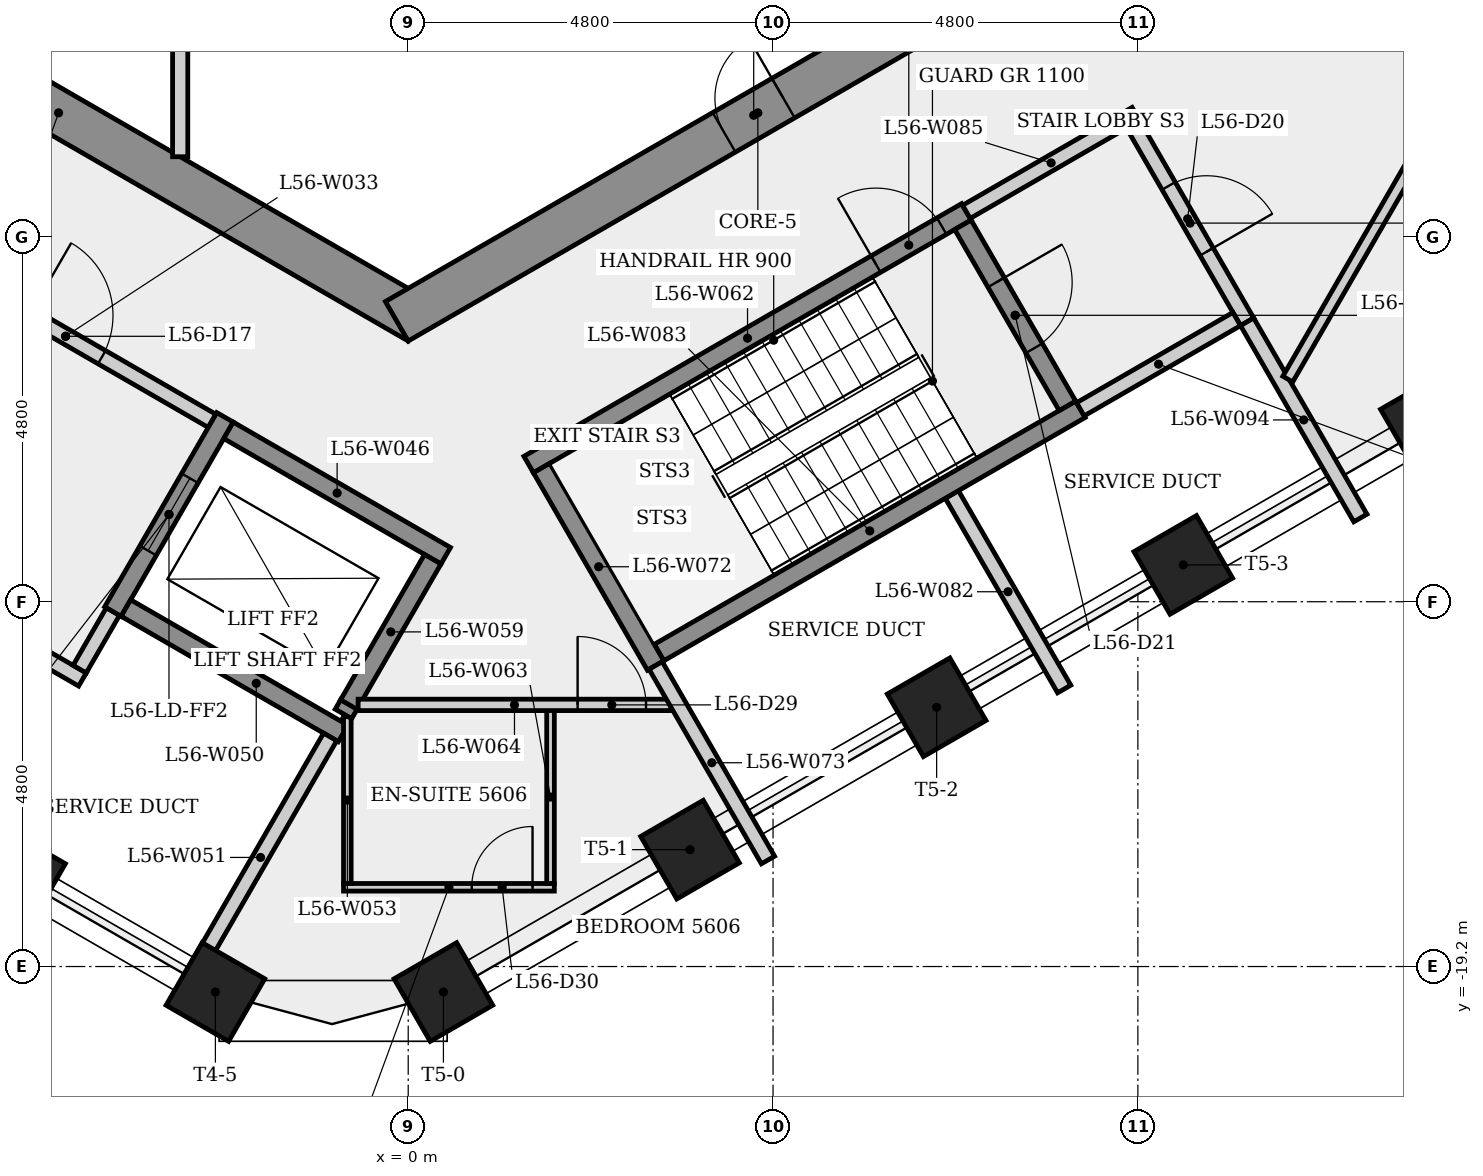
"""IFC4 building model, lengths in metres.
Left out: names, types, materials, properties, quantities, classifications, styles, units other than length and angle.
Written with IfcOpenShell. Run it as: python <this file> out.ifc"""

import sys

from ifc_helpers import new_model, si_unit, direction, frame, frame_2d, origin, origin_2d, place, context, subcontext, project, spatial, rectangle, extrude, element, fill, save


model = new_model("IFC4")
c1 = context("Model", 3, precision=1e-05, world=origin(), true_north=direction((0.0, 1.0)))
c2 = subcontext(c1, "Body", "Model", "MODEL_VIEW")
j1 = project(units=[si_unit("LENGTHUNIT", "METRE"), si_unit("PLANEANGLEUNIT", "RADIAN")], contexts=[c1])
p1 = place(None, origin())
s1 = spatial("IfcSite", under=j1, at=p1, CompositionType="ELEMENT")
p2 = place(p1, origin())
s2 = spatial("IfcBuilding", under=s1, at=p2, CompositionType="ELEMENT")
p3 = place(p2, frame((0.0, 0.0, 210.1)))
s3 = spatial("IfcBuildingStorey", under=s2, at=p3, CompositionType="ELEMENT", Elevation=210.1)
p4 = place(p3, frame((-9.35, -5.225, 0.0), z_axis=(0.0, 0.0, 1.0), x_axis=(0.866023993627, -0.500002442456, 0.0)))
e1 = element("IfcWall", 1, at=p4, inside=s3, PredefinedType="SHEAR", context=c2, shape_type="SweptSolid", body=[
    extrude(rectangle(XDim=10.97, YDim=0.6, at=frame_2d((5.485, 0.0))), origin(), (0.0, 0.0, 1.0), 4.0),
])
p5 = place(p4, frame((3.315, 0.0, 0.0)))
e2 = element("IfcOpeningElement", 2, at=p5, cuts=e1, PredefinedType="OPENING", context=c2, shape_type="SweptSolid", body=[
    extrude(rectangle(XDim=0.9, YDim=2.1, at=frame_2d((0.45, 1.05))), frame((0.0, 0.31, 0.0), z_axis=(0.0, -1.0, 0.0), x_axis=(1.0, 0.0, 0.0)), (0.0, 0.0, 1.0), 0.62),
])
p6 = place(p3, frame((-0.15, -10.71, 0.0), z_axis=(0.0, 0.0, 1.0), x_axis=(0.866023993627, 0.500002442456, 0.0)))
e3 = element("IfcWall", 3, at=p6, inside=s3, PredefinedType="SHEAR", context=c2, shape_type="SweptSolid", body=[
    extrude(rectangle(XDim=10.97, YDim=0.6, at=frame_2d((5.485, 0.0))), origin(), (0.0, 0.0, 1.0), 4.0),
])
p7 = place(p6, frame((4.972, 0.0, 0.0)))
e4 = element("IfcOpeningElement", 4, at=p7, cuts=e3, PredefinedType="OPENING", context=c2, shape_type="SweptSolid", body=[
    extrude(rectangle(XDim=0.9, YDim=2.1, at=frame_2d((0.45, 1.05))), frame((0.0, 0.31, 0.0), z_axis=(0.0, -1.0, 0.0), x_axis=(1.0, 0.0, 0.0)), (0.0, 0.0, 1.0), 0.62),
])
for number, where, z_axis, x_axis in (
    (5, (-5.159, -18.021, 0.0), (0.0, 0.0, 1.0), (-0.5, -0.866, 0.0)),
    (6, (-2.537, -19.535, 0.0), (0.0, 0.0, 1.0), (-0.5, -0.866, 0.0)),
    (7, (0.463, -19.535, 0.0), (0.0, 0.0, 1.0), (0.5, -0.866, 0.0)),
    (8, (3.708, -17.662, 0.0), (0.0, 0.0, 1.0), (0.5, -0.866, 0.0)),
    (9, (6.953, -15.789, 0.0), (0.0, 0.0, 1.0), (0.5, -0.866, 0.0)),
    (10, (10.197, -13.916, 0.0), (0.0, 0.0, 1.0), (0.5, -0.866, 0.0)),
    (11, (13.442, -12.042, 0.0), (0.0, 0.0, 1.0), (0.5, -0.866, 0.0)),
):
    element("IfcColumn", number, at=place(p3, frame(where, z_axis=z_axis, x_axis=x_axis)), inside=s3, PredefinedType="COLUMN", context=c2, shape_type="SweptSolid", body=[
        extrude(rectangle(XDim=0.95, YDim=0.95, at=origin_2d()), origin(), (0.0, 0.0, 1.0), 4.0),
    ])
p8 = place(p3, frame((-8.356, -13.073, 0.0), z_axis=(0.0, 0.0, 1.0), x_axis=(0.866038532462, -0.499977259774, 0.0)))
e12 = element("IfcWall", 12, at=p8, inside=s3, PredefinedType="PLUMBINGWALL", context=c2, shape_type="SweptSolid", body=[
    extrude(rectangle(XDim=4.7, YDim=0.2, at=frame_2d((2.35, 0.0))), origin(), (0.0, 0.0, 1.0), 3.6),
])
p9 = place(p3, frame((-6.435, -9.795, 0.0), z_axis=(0.0, 0.0, 1.0), x_axis=(0.866012907634, -0.500021643343, 0.0)))
e13 = element("IfcWall", 13, at=p9, inside=s3, PredefinedType="PARTITIONING", context=c2, shape_type="SweptSolid", body=[
    extrude(rectangle(XDim=4.45, YDim=0.2, at=frame_2d((2.225, 0.0))), origin(), (0.0, 0.0, 1.0), 3.6),
])
p10 = place(p9, frame((1.675, 0.0, 0.0)))
e14 = element("IfcOpeningElement", 14, at=p10, cuts=e13, PredefinedType="OPENING", context=c2, shape_type="SweptSolid", body=[
    extrude(rectangle(XDim=1.1, YDim=2.1, at=frame_2d((0.55, 1.05))), frame((0.0, 0.11, 0.0), z_axis=(0.0, -1.0, 0.0), x_axis=(1.0, 0.0, 0.0)), (0.0, 0.0, 1.0), 0.22),
])
p11 = place(p3, frame((-3.885, -14.529, 0.0), z_axis=(0.0, 0.0, 1.0), x_axis=(-0.499859285417, -0.866106630146, 0.0)))
e15 = element("IfcWall", 15, at=p11, inside=s3, PredefinedType="PLUMBINGWALL", context=c2, shape_type="SweptSolid", body=[
    extrude(rectangle(XDim=0.875, YDim=0.2, at=frame_2d((0.438, 0.0))), origin(), (0.0, 0.0, 1.0), 3.6),
])
p12 = place(p3, frame((-3.0, -5.25, 0.0), z_axis=(0.0, 0.0, 1.0), x_axis=(0.0, -1.0, 0.0)))
e16 = element("IfcWall", 16, at=p12, inside=s3, PredefinedType="PARTITIONING", context=c2, shape_type="SweptSolid", body=[
    extrude(rectangle(XDim=3.295, YDim=0.2, at=frame_2d((1.647, 0.0))), origin(), (0.0, 0.0, 1.0), 3.6),
])
p13 = place(p3, frame((-2.41, -11.974, 0.0), z_axis=(0.0, 0.0, 1.0), x_axis=(-0.500001826776, -0.866024349092, 0.0)))
e17 = element("IfcWall", 17, at=p13, inside=s3, PredefinedType="SHEAR", context=c2, shape_type="SweptSolid", body=[
    extrude(rectangle(XDim=2.95, YDim=0.25, at=frame_2d((1.475, 0.0))), origin(), (0.0, 0.0, 1.0), 3.6),
])
p14 = place(p13, frame((0.925, 0.0, 0.0)))
e18 = element("IfcOpeningElement", 18, at=p14, cuts=e17, PredefinedType="OPENING", context=c2, shape_type="SweptSolid", body=[
    extrude(rectangle(XDim=1.1, YDim=2.1, at=frame_2d((0.55, 1.05))), frame((0.0, 0.135, 0.0), z_axis=(0.0, -1.0, 0.0), x_axis=(1.0, 0.0, 0.0)), (0.0, 0.0, 1.0), 0.27),
])
p15 = place(p3, frame((-2.364, -12.145, 0.0), z_axis=(0.0, 0.0, 1.0), x_axis=(0.866040211805, -0.499974350878, 0.0)))
e19 = element("IfcWall", 19, at=p15, inside=s3, PredefinedType="SHEAR", context=c2, shape_type="SweptSolid", body=[
    extrude(rectangle(XDim=3.3, YDim=0.25, at=frame_2d((1.65, 0.0))), origin(), (0.0, 0.0, 1.0), 3.6),
])
p16 = place(p3, frame((-0.856, -16.133, 0.0), z_axis=(0.0, 0.0, 1.0), x_axis=(-0.866021716278, 0.500006386895, 0.0)))
e20 = element("IfcWall", 20, at=p16, inside=s3, PredefinedType="SHEAR", context=c2, shape_type="SweptSolid", body=[
    extrude(rectangle(XDim=3.3, YDim=0.25, at=frame_2d((1.65, 0.0))), origin(), (0.0, 0.0, 1.0), 3.6),
])
p17 = place(p3, frame((-1.027, -16.179, 0.0), z_axis=(0.0, 0.0, 1.0), x_axis=(-0.499989866495, -0.866031254287, 0.0)))
e21 = element("IfcWall", 21, at=p17, inside=s3, PredefinedType="PLUMBINGWALL", context=c2, shape_type="SweptSolid", body=[
    extrude(rectangle(XDim=3.662, YDim=0.2, at=frame_2d((1.831, 0.0))), origin(), (0.0, 0.0, 1.0), 3.6),
])
p18 = place(p3, frame((-0.851, -18.157, 0.0), z_axis=(0.0, 0.0, 1.0), x_axis=(1.0, 0.0, 0.0)))
e22 = element("IfcWall", 22, at=p18, inside=s3, PredefinedType="PARTITIONING", context=c2, shape_type="SweptSolid", body=[
    extrude(rectangle(XDim=2.773, YDim=0.1, at=frame_2d((1.387, 0.0))), origin(), (0.0, 0.0, 1.0), 3.6),
])
p19 = place(p18, frame((1.687, 0.0, 0.0)))
e23 = element("IfcOpeningElement", 23, at=p19, cuts=e22, PredefinedType="OPENING", context=c2, shape_type="SweptSolid", body=[
    extrude(rectangle(XDim=0.8, YDim=2.1, at=frame_2d((0.4, 1.05))), frame((0.0, 0.06, 0.0), z_axis=(0.0, -1.0, 0.0), x_axis=(1.0, 0.0, 0.0)), (0.0, 0.0, 1.0), 0.12),
])
p20 = place(p3, frame((-0.801, -15.912, 0.0), z_axis=(0.0, 0.0, 1.0), x_axis=(0.0, -1.0, 0.0)))
e24 = element("IfcWall", 24, at=p20, inside=s3, PredefinedType="PARTITIONING", context=c2, shape_type="SweptSolid", body=[
    extrude(rectangle(XDim=2.195, YDim=0.1, at=frame_2d((1.098, 0.0))), origin(), (0.0, 0.0, 1.0), 3.6),
])
p21 = place(p3, frame((-0.776, -15.744, 0.0), z_axis=(0.0, 0.0, 1.0), x_axis=(-0.499583827826, -0.866265547609, 0.0)))
e25 = element("IfcWall", 25, at=p21, inside=s3, PredefinedType="SHEAR", context=c2, shape_type="SweptSolid", body=[
    extrude(rectangle(XDim=0.153, YDim=0.25, at=frame_2d((0.076, 0.0))), origin(), (0.0, 0.0, 1.0), 4.0),
])
p22 = place(p3, frame((0.323, -13.841, 0.0), z_axis=(0.0, 0.0, 1.0), x_axis=(-0.500051022034, -0.865995944195, 0.0)))
e26 = element("IfcWall", 26, at=p22, inside=s3, PredefinedType="SHEAR", context=c2, shape_type="SweptSolid", body=[
    extrude(rectangle(XDim=2.208, YDim=0.25, at=frame_2d((1.104, 0.0))), origin(), (0.0, 0.0, 1.0), 4.0),
])
p23 = place(p3, frame((1.585, -12.595, 0.0), z_axis=(0.0, 0.0, 1.0), x_axis=(0.866036417653, 0.499980922934, 0.0)))
e27 = element("IfcWall", 27, at=p23, inside=s3, PredefinedType="SHEAR", context=c2, shape_type="SweptSolid", body=[
    extrude(rectangle(XDim=6.65, YDim=0.25, at=frame_2d((3.325, 0.0))), origin(), (0.0, 0.0, 1.0), 3.6),
])
p24 = place(p23, frame((5.275, 0.0, 0.0)))
e28 = element("IfcOpeningElement", 28, at=p24, cuts=e27, PredefinedType="OPENING", context=c2, shape_type="SweptSolid", body=[
    extrude(rectangle(XDim=1.0, YDim=2.1, at=frame_2d((0.5, 1.05))), frame((0.0, 0.135, 0.0), z_axis=(0.0, -1.0, 0.0), x_axis=(1.0, 0.0, 0.0)), (0.0, 0.0, 1.0), 0.27),
])
p25 = place(p3, frame((1.872, -18.107, 0.0), z_axis=(0.0, 0.0, 1.0), x_axis=(0.0, 1.0, 0.0)))
e29 = element("IfcWall", 29, at=p25, inside=s3, PredefinedType="PARTITIONING", context=c2, shape_type="SweptSolid", body=[
    extrude(rectangle(XDim=2.275, YDim=0.1, at=frame_2d((1.137, 0.0))), origin(), (0.0, 0.0, 1.0), 3.6),
])
p26 = place(p3, frame((-0.659, -15.757, 0.0), z_axis=(0.0, 0.0, 1.0), x_axis=(1.0, 0.0, 0.0)))
e30 = element("IfcWall", 30, at=p26, inside=s3, PredefinedType="PARTITIONING", context=c2, shape_type="SweptSolid", body=[
    extrude(rectangle(XDim=4.114, YDim=0.15, at=frame_2d((2.057, 0.0))), origin(), (0.0, 0.0, 1.0), 3.6),
])
p27 = place(p26, frame((2.887, 0.0, 0.0)))
e31 = element("IfcOpeningElement", 31, at=p27, cuts=e30, PredefinedType="OPENING", context=c2, shape_type="SweptSolid", body=[
    extrude(rectangle(XDim=0.9, YDim=2.1, at=frame_2d((0.45, 1.05))), frame((0.0, 0.085, 0.0), z_axis=(0.0, -1.0, 0.0), x_axis=(1.0, 0.0, 0.0)), (0.0, 0.0, 1.0), 0.17),
])
p28 = place(p3, frame((3.256, -15.239, 0.0), z_axis=(0.0, 0.0, 1.0), x_axis=(-0.50002537861, 0.866010750942, 0.0)))
e32 = element("IfcWall", 32, at=p28, inside=s3, PredefinedType="SHEAR", context=c2, shape_type="SweptSolid", body=[
    extrude(rectangle(XDim=3.0, YDim=0.25, at=frame_2d((1.5, 0.0))), origin(), (0.0, 0.0, 1.0), 3.6),
])
for number, where, z_axis, x_axis in (
    (33, (3.256, -15.239, 0.0), (0.0, 0.0, 1.0), (0.5, -0.866, 0.0)),
    (34, (7.153, -12.989, 0.0), (0.0, 0.0, 1.0), (0.5, -0.866, 0.0)),
):
    element("IfcWall", number, at=place(p3, frame(where, z_axis=z_axis, x_axis=x_axis)), inside=s3, PredefinedType="PLUMBINGWALL", context=c2, shape_type="SweptSolid", body=[
        extrude(rectangle(XDim=2.956, YDim=0.2, at=frame_2d((1.478, 0.0))), origin(), (0.0, 0.0, 1.0), 3.6),
    ])
p29 = place(p3, frame((3.301, -15.068, 0.0), z_axis=(0.0, 0.0, 1.0), x_axis=(0.866035036182, 0.499983315828, 0.0)))
e35 = element("IfcWall", 35, at=p29, inside=s3, PredefinedType="SHEAR", context=c2, shape_type="SweptSolid", body=[
    extrude(rectangle(XDim=6.4, YDim=0.25, at=frame_2d((3.2, 0.0))), origin(), (0.0, 0.0, 1.0), 4.0),
])
p30 = place(p3, frame((7.298, -9.441, 0.0), z_axis=(0.0, 0.0, 1.0), x_axis=(0.500034990121, -0.866005201286, 0.0)))
e36 = element("IfcWall", 36, at=p30, inside=s3, PredefinedType="SHEAR", context=c2, shape_type="SweptSolid", body=[
    extrude(rectangle(XDim=2.75, YDim=0.25, at=frame_2d((1.375, 0.0))), origin(), (0.0, 0.0, 1.0), 3.6),
])
p31 = place(p30, frame((0.875, 0.0, 0.0)))
e37 = element("IfcOpeningElement", 37, at=p31, cuts=e36, PredefinedType="OPENING", context=c2, shape_type="SweptSolid", body=[
    extrude(rectangle(XDim=1.0, YDim=2.1, at=frame_2d((0.5, 1.05))), frame((0.0, 0.135, 0.0), z_axis=(0.0, -1.0, 0.0), x_axis=(1.0, 0.0, 0.0)), (0.0, 0.0, 1.0), 0.27),
])
p32 = place(p3, frame((7.344, -9.27, 0.0), z_axis=(0.0, 0.0, 1.0), x_axis=(0.866005588531, 0.500034319456, 0.0)))
e38 = element("IfcWall", 38, at=p32, inside=s3, PredefinedType="PARTITIONING", context=c2, shape_type="SweptSolid", body=[
    extrude(rectangle(XDim=2.575, YDim=0.2, at=frame_2d((1.288, 0.0))), origin(), (0.0, 0.0, 1.0), 3.6),
])
p33 = place(p3, frame((9.537, -8.119, 0.0), z_axis=(0.0, 0.0, 1.0), x_axis=(0.499990139034, -0.866031096941, 0.0)))
e39 = element("IfcWall", 39, at=p33, inside=s3, PredefinedType="PARTITIONING", context=c2, shape_type="SweptSolid", body=[
    extrude(rectangle(XDim=3.0, YDim=0.2, at=frame_2d((1.5, 0.0))), origin(), (0.0, 0.0, 1.0), 3.6),
])
p34 = place(p33, frame((0.935, 0.0, 0.0)))
e40 = element("IfcOpeningElement", 40, at=p34, cuts=e39, PredefinedType="OPENING", context=c2, shape_type="SweptSolid", body=[
    extrude(rectangle(XDim=1.0, YDim=2.1, at=frame_2d((0.5, 1.05))), frame((0.0, 0.11, 0.0), z_axis=(0.0, -1.0, 0.0), x_axis=(1.0, 0.0, 0.0)), (0.0, 0.0, 1.0), 0.22),
])
p35 = place(p3, frame((11.037, -10.717, 0.0), z_axis=(0.0, 0.0, 1.0), x_axis=(0.499980071345, -0.866036909293, 0.0)))
e41 = element("IfcWall", 41, at=p35, inside=s3, PredefinedType="PLUMBINGWALL", context=c2, shape_type="SweptSolid", body=[
    extrude(rectangle(XDim=2.98, YDim=0.2, at=frame_2d((1.49, 0.0))), origin(), (0.0, 0.0, 1.0), 3.6),
])
p36 = place(p3, frame((10.901, -10.681, 0.0), z_axis=(0.0, 0.0, 1.0), x_axis=(-0.866007538022, -0.500030943131, 0.0)))
e42 = element("IfcWall", 42, at=p36, inside=s3, PredefinedType="PLUMBINGWALL", context=c2, shape_type="SweptSolid", body=[
    extrude(rectangle(XDim=2.375, YDim=0.2, at=frame_2d((1.188, 0.0))), origin(), (0.0, 0.0, 1.0), 3.6),
])
p37 = place(p3, frame((15.521, -4.632, 0.0), z_axis=(0.0, 0.0, 1.0), x_axis=(-0.499992740516, -0.866029595009, 0.0)))
e43 = element("IfcWall", 43, at=p37, inside=s3, PredefinedType="PARTITIONING", context=c2, shape_type="SweptSolid", body=[
    extrude(rectangle(XDim=7.897, YDim=0.15, at=frame_2d((3.948, 0.0))), origin(), (0.0, 0.0, 1.0), 3.6),
])
p38 = place(p37, frame((3.449, 0.0, 0.0)))
e44 = element("IfcOpeningElement", 44, at=p38, cuts=e43, PredefinedType="OPENING", context=c2, shape_type="SweptSolid", body=[
    extrude(rectangle(XDim=1.0, YDim=2.1, at=frame_2d((0.5, 1.05))), frame((0.0, 0.085, 0.0), z_axis=(0.0, -1.0, 0.0), x_axis=(1.0, 0.0, 0.0)), (0.0, 0.0, 1.0), 0.17),
])
p39 = place(p10, origin())
e45 = element("IfcDoor", 45, at=p39, inside=s3, OperationType="SINGLE_SWING_LEFT", PredefinedType="DOOR", context=c2, shape_type="SweptSolid", body=[
    extrude(rectangle(XDim=1.1, YDim=2.1, at=frame_2d((0.55, 1.05))), frame((0.0, 0.025, 0.0), z_axis=(0.0, -1.0, 0.0), x_axis=(1.0, 0.0, 0.0)), (0.0, 0.0, 1.0), 0.05),
])
fill(e14, e45)
p40 = place(p14, origin())
e46 = element("IfcDoor", 46, at=p40, inside=s3, OperationType="SLIDING_TO_LEFT", PredefinedType="DOOR", context=c2, shape_type="SweptSolid", body=[
    extrude(rectangle(XDim=1.1, YDim=2.1, at=frame_2d((0.55, 1.05))), frame((0.0, 0.025, 0.0), z_axis=(0.0, -1.0, 0.0), x_axis=(1.0, 0.0, 0.0)), (0.0, 0.0, 1.0), 0.05),
])
fill(e18, e46)
p41 = place(p24, origin())
e47 = element("IfcDoor", 47, at=p41, inside=s3, OperationType="SINGLE_SWING_LEFT", PredefinedType="DOOR", context=c2, shape_type="SweptSolid", body=[
    extrude(rectangle(XDim=1.0, YDim=2.1, at=frame_2d((0.5, 1.05))), frame((0.0, 0.025, 0.0), z_axis=(0.0, -1.0, 0.0), x_axis=(1.0, 0.0, 0.0)), (0.0, 0.0, 1.0), 0.05),
])
fill(e28, e47)
p42 = place(p34, origin())
e48 = element("IfcDoor", 48, at=p42, inside=s3, OperationType="SINGLE_SWING_RIGHT", PredefinedType="DOOR", context=c2, shape_type="SweptSolid", body=[
    extrude(rectangle(XDim=1.0, YDim=2.1, at=frame_2d((0.5, 1.05))), frame((0.0, 0.025, 0.0), z_axis=(0.0, -1.0, 0.0), x_axis=(1.0, 0.0, 0.0)), (0.0, 0.0, 1.0), 0.05),
])
fill(e40, e48)
p43 = place(p31, origin())
e49 = element("IfcDoor", 49, at=p43, inside=s3, OperationType="SINGLE_SWING_LEFT", PredefinedType="DOOR", context=c2, shape_type="SweptSolid", body=[
    extrude(rectangle(XDim=1.0, YDim=2.1, at=frame_2d((0.5, 1.05))), frame((0.0, 0.025, 0.0), z_axis=(0.0, -1.0, 0.0), x_axis=(1.0, 0.0, 0.0)), (0.0, 0.0, 1.0), 0.05),
])
fill(e37, e49)
p44 = place(p27, origin())
e50 = element("IfcDoor", 50, at=p44, inside=s3, OperationType="SINGLE_SWING_LEFT", PredefinedType="DOOR", context=c2, shape_type="SweptSolid", body=[
    extrude(rectangle(XDim=0.9, YDim=2.1, at=frame_2d((0.45, 1.05))), frame((0.0, 0.025, 0.0), z_axis=(0.0, -1.0, 0.0), x_axis=(1.0, 0.0, 0.0)), (0.0, 0.0, 1.0), 0.05),
])
fill(e31, e50)
p45 = place(p19, origin())
e51 = element("IfcDoor", 51, at=p45, inside=s3, OperationType="SINGLE_SWING_RIGHT", PredefinedType="DOOR", context=c2, shape_type="SweptSolid", body=[
    extrude(rectangle(XDim=0.8, YDim=2.1, at=frame_2d((0.4, 1.05))), frame((0.0, 0.025, 0.0), z_axis=(0.0, -1.0, 0.0), x_axis=(1.0, 0.0, 0.0)), (0.0, 0.0, 1.0), 0.05),
])
fill(e23, e51)
p46 = place(p7, origin())
e52 = element("IfcDoor", 52, at=p46, inside=s3, OperationType="SINGLE_SWING_RIGHT", PredefinedType="DOOR", context=c2, shape_type="SweptSolid", body=[
    extrude(rectangle(XDim=0.9, YDim=2.1, at=frame_2d((0.45, 1.05))), frame((0.0, 0.025, 0.0), z_axis=(0.0, -1.0, 0.0), x_axis=(1.0, 0.0, 0.0)), (0.0, 0.0, 1.0), 0.05),
])
fill(e4, e52)
save(model, sys.argv[1])
